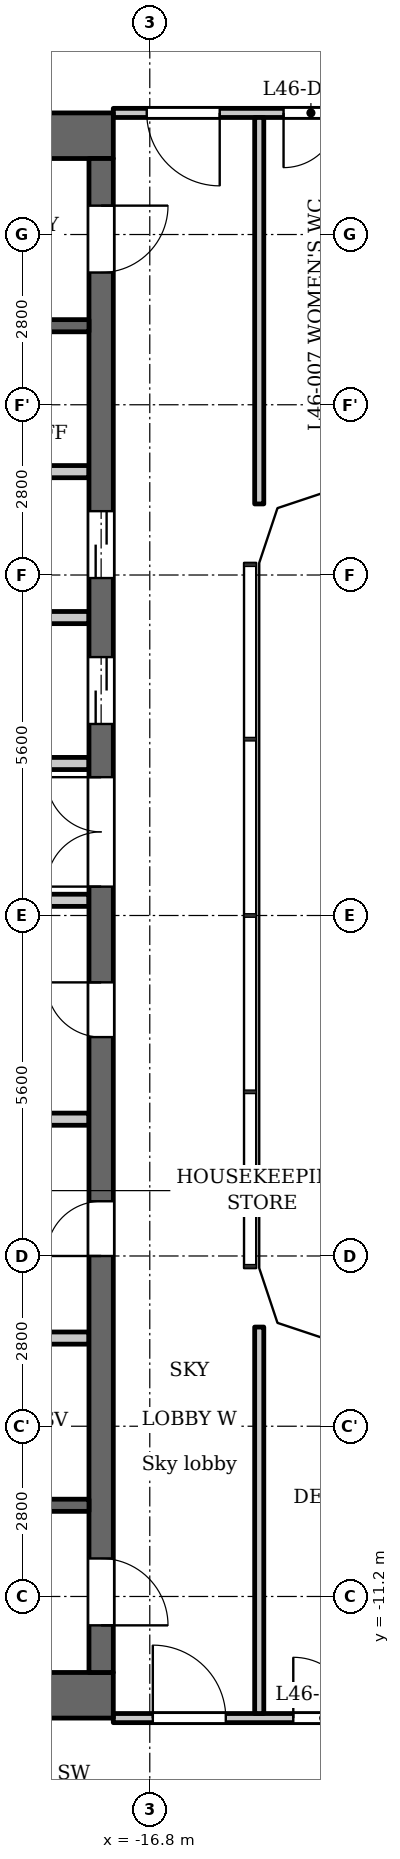
"""IFC4 building model, lengths in metres.
Left out: names, types, materials, properties, quantities, classifications, styles, units other than length and angle.
Written with IfcOpenShell. Run it as: python <this file> out.ifc"""

import sys

from ifc_helpers import new_model, si_unit, direction, frame, frame_2d, origin, place, context, subcontext, project, spatial, polyline, rectangle, outline, extrude, element, fill, save


model = new_model("IFC4")
c1 = context("Model", 3, precision=1e-05, world=origin(), true_north=direction((0.0, 1.0)))
c2 = subcontext(c1, "Body", "Model", "MODEL_VIEW")
j1 = project(units=[si_unit("LENGTHUNIT", "METRE"), si_unit("PLANEANGLEUNIT", "RADIAN")], contexts=[c1])
p1 = place(None, origin())
s1 = spatial("IfcSite", under=j1, at=p1, CompositionType="ELEMENT")
p2 = place(p1, origin())
s2 = spatial("IfcBuilding", under=s1, at=p2, CompositionType="ELEMENT")
p3 = place(p2, frame((0.0, 0.0, 178.1)))
s3 = spatial("IfcBuildingStorey", under=s2, at=p3, CompositionType="ELEMENT", Elevation=178.1)
for number, where, z_axis, x_axis in (
    (1, (-17.4, 12.825, 0.0), (0.0, 0.0, 1.0), (-1.0, 0.0, 0.0)),
    (2, (-17.4, -12.825, 0.0), (0.0, 0.0, 1.0), (-1.0, 0.0, 0.0)),
):
    element("IfcWall", number, at=place(p3, frame(where, z_axis=z_axis, x_axis=x_axis)), inside=s3, PredefinedType="SHEAR", context=c2, shape_type="SweptSolid", body=[
        extrude(rectangle(XDim=10.4, YDim=0.75, at=frame_2d((5.2, 0.0))), origin(), (0.0, 0.0, 1.0), 4.95),
    ])
p4 = place(p3, frame((-17.8, -3.35, 0.0), z_axis=(0.0, 0.0, 1.0), x_axis=(-1.0, 0.0, 0.0)))
e3 = element("IfcWall", 3, at=p4, inside=s3, PredefinedType="PARTITIONING", context=c2, shape_type="SweptSolid", body=[
    extrude(rectangle(XDim=2.8, YDim=0.2, at=frame_2d((1.4, 0.0))), origin(), (0.0, 0.0, 1.0), 4.95),
])
p5 = place(p3, frame((-17.6, -12.45, 0.0), z_axis=(0.0, 0.0, 1.0), x_axis=(0.0, 1.0, 0.0)))
e4 = element("IfcWall", 4, at=p5, inside=s3, PredefinedType="SHEAR", context=c2, shape_type="SweptSolid", body=[
    extrude(rectangle(XDim=24.9, YDim=0.4, at=frame_2d((12.45, 0.0))), origin(), (0.0, 0.0, 1.0), 4.95),
])
p6 = place(p5, frame((6.85, 0.0, 0.0)))
e5 = element("IfcOpeningElement", 5, at=p6, cuts=e4, PredefinedType="OPENING", context=c2, shape_type="SweptSolid", body=[
    extrude(rectangle(XDim=0.9, YDim=2.1, at=frame_2d((0.45, 1.05))), frame((0.0, 0.21, 0.0), z_axis=(0.0, -1.0, 0.0), x_axis=(1.0, 0.0, 0.0)), (0.0, 0.0, 1.0), 0.42),
])
p7 = place(p5, frame((10.45, 0.0, 0.0)))
e6 = element("IfcOpeningElement", 6, at=p7, cuts=e4, PredefinedType="OPENING", context=c2, shape_type="SweptSolid", body=[
    extrude(rectangle(XDim=0.9, YDim=2.1, at=frame_2d((0.45, 1.05))), frame((0.0, 0.21, 0.0), z_axis=(0.0, -1.0, 0.0), x_axis=(1.0, 0.0, 0.0)), (0.0, 0.0, 1.0), 0.42),
])
p8 = place(p5, frame((15.6, 0.0, 0.0)))
e7 = element("IfcOpeningElement", 7, at=p8, cuts=e4, PredefinedType="OPENING", context=c2, shape_type="SweptSolid", body=[
    extrude(rectangle(XDim=1.1, YDim=2.1, at=frame_2d((0.55, 1.05))), frame((0.0, 0.21, 0.0), z_axis=(0.0, -1.0, 0.0), x_axis=(1.0, 0.0, 0.0)), (0.0, 0.0, 1.0), 0.42),
])
p9 = place(p5, frame((18.0, 0.0, 0.0)))
e8 = element("IfcOpeningElement", 8, at=p9, cuts=e4, PredefinedType="OPENING", context=c2, shape_type="SweptSolid", body=[
    extrude(rectangle(XDim=1.1, YDim=2.1, at=frame_2d((0.55, 1.05))), frame((0.0, 0.21, 0.0), z_axis=(0.0, -1.0, 0.0), x_axis=(1.0, 0.0, 0.0)), (0.0, 0.0, 1.0), 0.42),
])
p10 = place(p5, frame((23.025, 0.0, 0.0)))
e9 = element("IfcOpeningElement", 9, at=p10, cuts=e4, PredefinedType="OPENING", context=c2, shape_type="SweptSolid", body=[
    extrude(rectangle(XDim=1.1, YDim=2.1, at=frame_2d((0.55, 1.05))), frame((0.0, 0.21, 0.0), z_axis=(0.0, -1.0, 0.0), x_axis=(1.0, 0.0, 0.0)), (0.0, 0.0, 1.0), 0.42),
])
p11 = place(p5, frame((0.775, 0.0, 0.0)))
e10 = element("IfcOpeningElement", 10, at=p11, cuts=e4, PredefinedType="OPENING", context=c2, shape_type="SweptSolid", body=[
    extrude(rectangle(XDim=1.1, YDim=2.1, at=frame_2d((0.55, 1.05))), frame((0.0, 0.21, 0.0), z_axis=(0.0, -1.0, 0.0), x_axis=(1.0, 0.0, 0.0)), (0.0, 0.0, 1.0), 0.42),
])
p12 = place(p5, frame((12.925, 0.0, 0.0)))
e11 = element("IfcOpeningElement", 11, at=p12, cuts=e4, PredefinedType="OPENING", context=c2, shape_type="SweptSolid", body=[
    extrude(rectangle(XDim=1.8, YDim=2.1, at=frame_2d((0.9, 1.05))), frame((0.0, 0.21, 0.0), z_axis=(0.0, -1.0, 0.0), x_axis=(1.0, 0.0, 0.0)), (0.0, 0.0, 1.0), 0.42),
])
p13 = place(p3, frame((-17.8, -9.7, 0.0), z_axis=(0.0, 0.0, 1.0), x_axis=(-1.0, 0.0, 0.0)))
e12 = element("IfcWall", 12, at=p13, inside=s3, PredefinedType="SHEAR", context=c2, shape_type="SweptSolid", body=[
    extrude(rectangle(XDim=8.45, YDim=0.2, at=frame_2d((4.225, 0.0))), origin(), (0.0, 0.0, 1.0), 4.95),
])
p14 = place(p13, frame((0.85, 0.0, 0.0)))
e13 = element("IfcOpeningElement", 13, at=p14, cuts=e12, PredefinedType="OPENING", context=c2, shape_type="SweptSolid", body=[
    extrude(rectangle(XDim=1.1, YDim=2.1, at=frame_2d((0.55, 1.05))), frame((0.0, 0.11, 0.0), z_axis=(0.0, -1.0, 0.0), x_axis=(1.0, 0.0, 0.0)), (0.0, 0.0, 1.0), 0.22),
])
p15 = place(p13, frame((3.75, 0.0, 0.0)))
e14 = element("IfcOpeningElement", 14, at=p15, cuts=e12, PredefinedType="OPENING", context=c2, shape_type="SweptSolid", body=[
    extrude(rectangle(XDim=1.1, YDim=2.1, at=frame_2d((0.55, 1.05))), frame((0.0, 0.11, 0.0), z_axis=(0.0, -1.0, 0.0), x_axis=(1.0, 0.0, 0.0)), (0.0, 0.0, 1.0), 0.22),
])
p16 = place(p3, frame((-17.8, -6.95, 0.0), z_axis=(0.0, 0.0, 1.0), x_axis=(-1.0, 0.0, 0.0)))
e15 = element("IfcWall", 15, at=p16, inside=s3, PredefinedType="PARTITIONING", context=c2, shape_type="SweptSolid", body=[
    extrude(rectangle(XDim=2.8, YDim=0.2, at=frame_2d((1.4, 0.0))), origin(), (0.0, 0.0, 1.0), 4.95),
])
for number, where, z_axis, x_axis in (
    (16, (-17.8, 0.25, 0.0), (0.0, 0.0, 1.0), (-1.0, 0.0, 0.0)),
    (17, (-17.8, 2.5, 0.0), (0.0, 0.0, 1.0), (-1.0, 0.0, 0.0)),
):
    element("IfcWall", number, at=place(p3, frame(where, z_axis=z_axis, x_axis=x_axis)), inside=s3, PredefinedType="PARTITIONING", context=c2, shape_type="SweptSolid", body=[
        extrude(rectangle(XDim=3.0, YDim=0.2, at=frame_2d((1.5, 0.0))), origin(), (0.0, 0.0, 1.0), 4.95),
    ])
for number, where, z_axis, x_axis in (
    (18, (-17.8, 4.9, 0.0), (0.0, 0.0, 1.0), (-1.0, 0.0, 0.0)),
    (19, (-17.8, 7.3, 0.0), (0.0, 0.0, 1.0), (-1.0, 0.0, 0.0)),
):
    element("IfcWall", number, at=place(p3, frame(where, z_axis=z_axis, x_axis=x_axis)), inside=s3, PredefinedType="PARTITIONING", context=c2, shape_type="SweptSolid", body=[
        extrude(rectangle(XDim=2.8, YDim=0.2, at=frame_2d((1.4, 0.0))), origin(), (0.0, 0.0, 1.0), 4.95),
    ])
p17 = place(p3, frame((-17.8, 9.7, 0.0), z_axis=(0.0, 0.0, 1.0), x_axis=(-1.0, 0.0, 0.0)))
e20 = element("IfcWall", 20, at=p17, inside=s3, PredefinedType="SHEAR", context=c2, shape_type="SweptSolid", body=[
    extrude(rectangle(XDim=8.45, YDim=0.2, at=frame_2d((4.225, 0.0))), origin(), (0.0, 0.0, 1.0), 4.95),
])
p18 = place(p17, frame((0.85, 0.0, 0.0)))
e21 = element("IfcOpeningElement", 21, at=p18, cuts=e20, PredefinedType="OPENING", context=c2, shape_type="SweptSolid", body=[
    extrude(rectangle(XDim=1.1, YDim=2.1, at=frame_2d((0.55, 1.05))), frame((0.0, 0.11, 0.0), z_axis=(0.0, -1.0, 0.0), x_axis=(1.0, 0.0, 0.0)), (0.0, 0.0, 1.0), 0.22),
])
p19 = place(p17, frame((3.75, 0.0, 0.0)))
e22 = element("IfcOpeningElement", 22, at=p19, cuts=e20, PredefinedType="OPENING", context=c2, shape_type="SweptSolid", body=[
    extrude(rectangle(XDim=1.1, YDim=2.1, at=frame_2d((0.55, 1.05))), frame((0.0, 0.11, 0.0), z_axis=(0.0, -1.0, 0.0), x_axis=(1.0, 0.0, 0.0)), (0.0, 0.0, 1.0), 0.22),
])
p20 = place(p3, frame((-17.4, -13.2, 0.0), z_axis=(0.0, 0.0, 1.0), x_axis=(1.0, 0.0, 0.0)))
e23 = element("IfcWall", 23, at=p20, inside=s3, PredefinedType="PARTITIONING", context=c2, shape_type="SweptSolid", body=[
    extrude(rectangle(XDim=6.016, YDim=0.15, at=frame_2d((3.008, 0.0))), origin(), (0.0, 0.0, 1.0), 4.95),
])
p21 = place(p20, frame((0.65, 0.0, 0.0)))
e24 = element("IfcOpeningElement", 24, at=p21, cuts=e23, PredefinedType="OPENING", context=c2, shape_type="SweptSolid", body=[
    extrude(rectangle(XDim=1.2, YDim=2.1, at=frame_2d((0.6, 1.05))), frame((0.0, 0.085, 0.0), z_axis=(0.0, -1.0, 0.0), x_axis=(1.0, 0.0, 0.0)), (0.0, 0.0, 1.0), 0.17),
])
p22 = place(p20, frame((2.96, 0.0, 0.0)))
e25 = element("IfcOpeningElement", 25, at=p22, cuts=e23, PredefinedType="OPENING", context=c2, shape_type="SweptSolid", body=[
    extrude(rectangle(XDim=1.0, YDim=2.1, at=frame_2d((0.5, 1.05))), frame((0.0, 0.085, 0.0), z_axis=(0.0, -1.0, 0.0), x_axis=(1.0, 0.0, 0.0)), (0.0, 0.0, 1.0), 0.17),
])
p23 = place(p3, frame((-17.4, 13.2, 0.0), z_axis=(0.0, 0.0, 1.0), x_axis=(1.0, 0.0, 0.0)))
e26 = element("IfcWall", 26, at=p23, inside=s3, PredefinedType="PARTITIONING", context=c2, shape_type="SweptSolid", body=[
    extrude(rectangle(XDim=6.016, YDim=0.15, at=frame_2d((3.008, 0.0))), origin(), (0.0, 0.0, 1.0), 4.95),
])
p24 = place(p23, frame((0.55, 0.0, 0.0)))
e27 = element("IfcOpeningElement", 27, at=p24, cuts=e26, PredefinedType="OPENING", context=c2, shape_type="SweptSolid", body=[
    extrude(rectangle(XDim=1.2, YDim=2.1, at=frame_2d((0.6, 1.05))), frame((0.0, 0.085, 0.0), z_axis=(0.0, -1.0, 0.0), x_axis=(1.0, 0.0, 0.0)), (0.0, 0.0, 1.0), 0.17),
])
p25 = place(p23, frame((4.7, 0.0, 0.0)))
e28 = element("IfcOpeningElement", 28, at=p25, cuts=e26, PredefinedType="OPENING", context=c2, shape_type="SweptSolid", body=[
    extrude(rectangle(XDim=0.9, YDim=2.1, at=frame_2d((0.45, 1.05))), frame((0.0, 0.085, 0.0), z_axis=(0.0, -1.0, 0.0), x_axis=(1.0, 0.0, 0.0)), (0.0, 0.0, 1.0), 0.17),
])
p26 = place(p23, frame((2.8, 0.0, 0.0)))
e29 = element("IfcOpeningElement", 29, at=p26, cuts=e26, PredefinedType="OPENING", context=c2, shape_type="SweptSolid", body=[
    extrude(rectangle(XDim=0.9, YDim=2.1, at=frame_2d((0.45, 1.05))), frame((0.0, 0.085, 0.0), z_axis=(0.0, -1.0, 0.0), x_axis=(1.0, 0.0, 0.0)), (0.0, 0.0, 1.0), 0.17),
])
for number, where, z_axis, x_axis in (
    (30, (-15.0, -13.125, 0.0), (0.0, 0.0, 1.0), (0.0, 1.0, 0.0)),
    (31, (-15.0, 6.769, 0.0), (0.0, 0.0, 1.0), (0.0, 1.0, 0.0)),
):
    element("IfcWall", number, at=place(p3, frame(where, z_axis=z_axis, x_axis=x_axis)), inside=s3, PredefinedType="PARTITIONING", context=c2, shape_type="SweptSolid", body=[
        extrude(rectangle(XDim=6.356, YDim=0.15, at=frame_2d((3.178, 0.0))), origin(), (0.0, 0.0, 1.0), 4.95),
    ])
p27 = place(p3, origin())
e32 = element("IfcWall", 32, at=p27, inside=s3, PredefinedType="SOLIDWALL", context=c2, shape_type="SweptSolid", body=[
    extrude(outline(polyline([(-15.0, 5.8), (-14.7, 6.7), (-13.8, 7.0), (-13.8, 7.3), (-13.849, 7.3), (-14.937, 6.937), (-15.3, 5.849), (-15.3, 5.8), (-15.0, 5.8)])), origin(), (0.0, 0.0, 1.0), 4.95),
])
e33 = element("IfcWall", 33, at=p27, inside=s3, PredefinedType="SOLIDWALL", context=c2, shape_type="SweptSolid", body=[
    extrude(outline(polyline([(-13.8, -7.0), (-14.7, -6.7), (-15.0, -5.8), (-15.3, -5.8), (-15.3, -5.849), (-14.937, -6.937), (-13.849, -7.3), (-13.8, -7.3), (-13.8, -7.0)])), origin(), (0.0, 0.0, 1.0), 4.95),
])
p28 = place(p6, origin())
e34 = element("IfcDoor", 34, at=p28, inside=s3, OperationType="SINGLE_SWING_RIGHT", PredefinedType="DOOR", context=c2, shape_type="SweptSolid", body=[
    extrude(rectangle(XDim=0.9, YDim=2.1, at=frame_2d((0.45, 1.05))), frame((0.0, 0.025, 0.0), z_axis=(0.0, -1.0, 0.0), x_axis=(1.0, 0.0, 0.0)), (0.0, 0.0, 1.0), 0.05),
])
fill(e5, e34)
p29 = place(p7, origin())
e35 = element("IfcDoor", 35, at=p29, inside=s3, OperationType="SINGLE_SWING_LEFT", PredefinedType="DOOR", context=c2, shape_type="SweptSolid", body=[
    extrude(rectangle(XDim=0.9, YDim=2.1, at=frame_2d((0.45, 1.05))), frame((0.0, 0.025, 0.0), z_axis=(0.0, -1.0, 0.0), x_axis=(1.0, 0.0, 0.0)), (0.0, 0.0, 1.0), 0.05),
])
fill(e6, e35)
p30 = place(p8, origin())
e36 = element("IfcDoor", 36, at=p30, inside=s3, OperationType="DOUBLE_DOOR_SLIDING", PredefinedType="DOOR", context=c2, shape_type="SweptSolid", body=[
    extrude(rectangle(XDim=1.1, YDim=2.1, at=frame_2d((0.55, 1.05))), frame((0.0, 0.025, 0.0), z_axis=(0.0, -1.0, 0.0), x_axis=(1.0, 0.0, 0.0)), (0.0, 0.0, 1.0), 0.05),
])
fill(e7, e36)
p31 = place(p9, origin())
e37 = element("IfcDoor", 37, at=p31, inside=s3, OperationType="DOUBLE_DOOR_SLIDING", PredefinedType="DOOR", context=c2, shape_type="SweptSolid", body=[
    extrude(rectangle(XDim=1.1, YDim=2.1, at=frame_2d((0.55, 1.05))), frame((0.0, 0.025, 0.0), z_axis=(0.0, -1.0, 0.0), x_axis=(1.0, 0.0, 0.0)), (0.0, 0.0, 1.0), 0.05),
])
fill(e8, e37)
p32 = place(p10, origin())
e38 = element("IfcDoor", 38, at=p32, inside=s3, OperationType="SINGLE_SWING_RIGHT", PredefinedType="DOOR", context=c2, shape_type="SweptSolid", body=[
    extrude(rectangle(XDim=1.1, YDim=2.1, at=frame_2d((0.55, 1.05))), frame((0.0, 0.025, 0.0), z_axis=(0.0, -1.0, 0.0), x_axis=(1.0, 0.0, 0.0)), (0.0, 0.0, 1.0), 0.05),
])
fill(e9, e38)
p33 = place(p11, origin())
e39 = element("IfcDoor", 39, at=p33, inside=s3, OperationType="SINGLE_SWING_LEFT", PredefinedType="DOOR", context=c2, shape_type="SweptSolid", body=[
    extrude(rectangle(XDim=1.1, YDim=2.1, at=frame_2d((0.55, 1.05))), frame((0.0, 0.025, 0.0), z_axis=(0.0, -1.0, 0.0), x_axis=(1.0, 0.0, 0.0)), (0.0, 0.0, 1.0), 0.05),
])
fill(e10, e39)
p34 = place(p12, origin())
e40 = element("IfcDoor", 40, at=p34, inside=s3, OperationType="DOUBLE_DOOR_SINGLE_SWING", PredefinedType="DOOR", context=c2, shape_type="SweptSolid", body=[
    extrude(rectangle(XDim=1.8, YDim=2.1, at=frame_2d((0.9, 1.05))), frame((0.0, 0.025, 0.0), z_axis=(0.0, -1.0, 0.0), x_axis=(1.0, 0.0, 0.0)), (0.0, 0.0, 1.0), 0.05),
])
fill(e11, e40)
p35 = place(p24, origin())
e41 = element("IfcDoor", 41, at=p35, inside=s3, OperationType="SINGLE_SWING_RIGHT", PredefinedType="DOOR", context=c2, shape_type="SweptSolid", body=[
    extrude(rectangle(XDim=1.2, YDim=2.1, at=frame_2d((0.6, 1.05))), frame((0.0, 0.025, 0.0), z_axis=(0.0, -1.0, 0.0), x_axis=(1.0, 0.0, 0.0)), (0.0, 0.0, 1.0), 0.05),
])
fill(e27, e41)
p36 = place(p26, origin())
e42 = element("IfcDoor", 42, at=p36, inside=s3, OperationType="SINGLE_SWING_LEFT", PredefinedType="DOOR", context=c2, shape_type="SweptSolid", body=[
    extrude(rectangle(XDim=0.9, YDim=2.1, at=frame_2d((0.45, 1.05))), frame((0.0, 0.025, 0.0), z_axis=(0.0, -1.0, 0.0), x_axis=(1.0, 0.0, 0.0)), (0.0, 0.0, 1.0), 0.05),
])
fill(e29, e42)
p37 = place(p21, origin())
e43 = element("IfcDoor", 43, at=p37, inside=s3, OperationType="SINGLE_SWING_RIGHT", PredefinedType="DOOR", context=c2, shape_type="SweptSolid", body=[
    extrude(rectangle(XDim=1.2, YDim=2.1, at=frame_2d((0.6, 1.05))), frame((0.0, 0.025, 0.0), z_axis=(0.0, -1.0, 0.0), x_axis=(1.0, 0.0, 0.0)), (0.0, 0.0, 1.0), 0.05),
])
fill(e24, e43)
p38 = place(p22, origin())
e44 = element("IfcDoor", 44, at=p38, inside=s3, OperationType="SINGLE_SWING_RIGHT", PredefinedType="DOOR", context=c2, shape_type="SweptSolid", body=[
    extrude(rectangle(XDim=1.0, YDim=2.1, at=frame_2d((0.5, 1.05))), frame((0.0, 0.025, 0.0), z_axis=(0.0, -1.0, 0.0), x_axis=(1.0, 0.0, 0.0)), (0.0, 0.0, 1.0), 0.05),
])
fill(e25, e44)
save(model, sys.argv[1])
